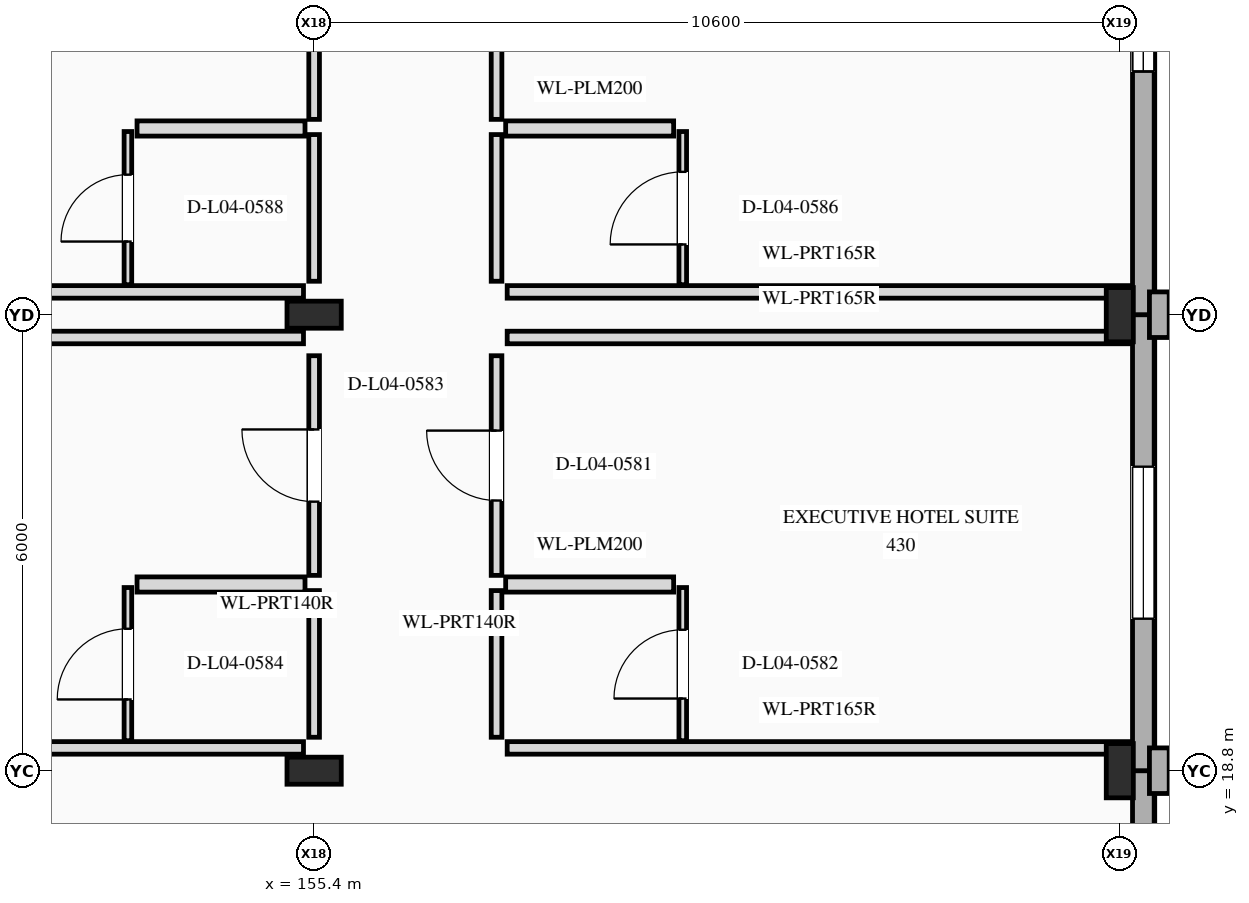
"""IFC4 building model, lengths in metres.
Left out: names, types, materials, properties, quantities, classifications, styles, units other than length and angle.
Written with IfcOpenShell. Run it as: python <this file> out.ifc"""

import sys

from ifc_helpers import new_model, si_unit, direction, frame, frame_2d, origin, origin_2d, place, context, subcontext, project, spatial, rectangle, i_section, extrude, element, fill, save


model = new_model("IFC4")
c1 = context("Model", 3, precision=1e-05, world=origin(), true_north=direction((0.0, 1.0)))
c2 = subcontext(c1, "Body", "Model", "MODEL_VIEW")
j1 = project(units=[si_unit("LENGTHUNIT", "METRE"), si_unit("PLANEANGLEUNIT", "RADIAN")], contexts=[c1])
p1 = place(None, origin())
s1 = spatial("IfcSite", under=j1, at=p1, CompositionType="ELEMENT")
p2 = place(p1, origin())
s2 = spatial("IfcBuilding", under=s1, at=p2, CompositionType="ELEMENT")
p3 = place(p2, frame((0.0, 0.0, 19.5)))
s3 = spatial("IfcBuildingStorey", under=s2, at=p3, CompositionType="ELEMENT", Elevation=19.5)
for number, where, z_axis, x_axis in (
    (1, (155.4, 18.8, 0.0), (0.0, 0.0, 1.0), (0.0, 1.0, 0.0)),
    (2, (155.4, 24.8, 0.0), (0.0, 0.0, 1.0), (0.0, 1.0, 0.0)),
    (3, (166.0, 18.8, 0.0), (0.0, 0.0, 1.0), (1.0, 0.0, 0.0)),
    (4, (166.0, 24.8, 0.0), (0.0, 0.0, 1.0), (1.0, 0.0, 0.0)),
):
    element("IfcColumn", number, at=place(p3, frame(where, z_axis=z_axis, x_axis=x_axis)), inside=s3, PredefinedType="COLUMN", context=c2, shape_type="SweptSolid", body=[
        extrude(i_section(OverallWidth=0.356, OverallDepth=0.714, WebThickness=0.019, FlangeThickness=0.034, at=origin_2d()), origin(), (0.0, 0.0, 1.0), 3.9),
    ])
p4 = place(p3, frame((166.31, 14.46, 0.0), z_axis=(0.0, 0.0, 1.0), x_axis=(0.0, 1.0, 0.0)))
e5 = element("IfcWall", 5, at=p4, inside=s3, PredefinedType="STANDARD", context=c2, shape_type="SweptSolid", body=[
    extrude(rectangle(XDim=4.34, YDim=0.285, at=frame_2d((2.17, 0.0))), origin(), (0.0, 0.0, 1.0), 3.9),
])
p5 = place(p4, frame((1.42, 0.0, 0.88)))
e6 = element("IfcOpeningElement", 6, at=p5, cuts=e5, PredefinedType="OPENING", context=c2, shape_type="SweptSolid", body=[
    extrude(rectangle(XDim=1.5, YDim=1.7, at=frame_2d((0.75, 0.85))), frame((0.0, 0.152, 0.0), z_axis=(0.0, -1.0, 0.0), x_axis=(1.0, 0.0, 0.0)), (0.0, 0.0, 1.0), 0.305),
])
p6 = place(p3, frame((166.31, 18.8, 0.0), z_axis=(0.0, 0.0, 1.0), x_axis=(0.0, 1.0, 0.0)))
e7 = element("IfcWall", 7, at=p6, inside=s3, PredefinedType="STANDARD", context=c2, shape_type="SweptSolid", body=[
    extrude(rectangle(XDim=6.0, YDim=0.285, at=frame_2d((3.0, 0.0))), origin(), (0.0, 0.0, 1.0), 3.9),
])
p7 = place(p6, frame((2.0, 0.0, 0.85)))
e8 = element("IfcOpeningElement", 8, at=p7, cuts=e7, PredefinedType="OPENING", context=c2, shape_type="SweptSolid", body=[
    extrude(rectangle(XDim=2.0, YDim=1.65, at=frame_2d((1.0, 0.825))), frame((0.0, 0.152, 0.0), z_axis=(0.0, -1.0, 0.0), x_axis=(1.0, 0.0, 0.0)), (0.0, 0.0, 1.0), 0.305),
])
p8 = place(p3, frame((166.52, 18.5, 0.0), z_axis=(0.0, 0.0, 1.0), x_axis=(0.0, 1.0, 0.0)))
e9 = element("IfcWall", 9, at=p8, inside=s3, PredefinedType="ELEMENTEDWALL", context=c2, shape_type="SweptSolid", body=[
    extrude(rectangle(XDim=0.6, YDim=0.26, at=frame_2d((0.3, 0.0))), origin(), (0.0, 0.0, 1.0), 3.9),
])
p9 = place(p3, frame((166.31, 24.8, 0.0), z_axis=(0.0, 0.0, 1.0), x_axis=(0.0, 1.0, 0.0)))
e10 = element("IfcWall", 10, at=p9, inside=s3, PredefinedType="STANDARD", context=c2, shape_type="SweptSolid", body=[
    extrude(rectangle(XDim=8.4, YDim=0.285, at=frame_2d((4.2, 0.0))), origin(), (0.0, 0.0, 1.0), 3.9),
])
p10 = place(p9, frame((3.2, 0.0, 0.85)))
e11 = element("IfcOpeningElement", 11, at=p10, cuts=e10, PredefinedType="OPENING", context=c2, shape_type="SweptSolid", body=[
    extrude(rectangle(XDim=2.0, YDim=1.65, at=frame_2d((1.0, 0.825))), frame((0.0, 0.152, 0.0), z_axis=(0.0, -1.0, 0.0), x_axis=(1.0, 0.0, 0.0)), (0.0, 0.0, 1.0), 0.305),
])
p11 = place(p3, frame((166.52, 24.5, 0.0), z_axis=(0.0, 0.0, 1.0), x_axis=(0.0, 1.0, 0.0)))
e12 = element("IfcWall", 12, at=p11, inside=s3, PredefinedType="ELEMENTEDWALL", context=c2, shape_type="SweptSolid", body=[
    extrude(rectangle(XDim=0.6, YDim=0.26, at=frame_2d((0.3, 0.0))), origin(), (0.0, 0.0, 1.0), 3.9),
])
p12 = place(p3, frame((157.8, 19.24, 0.0), z_axis=(0.0, 0.0, 1.0), x_axis=(0.0, 1.0, 0.0)))
e13 = element("IfcWall", 13, at=p12, inside=s3, PredefinedType="PARTITIONING", context=c2, shape_type="SweptSolid", body=[
    extrude(rectangle(XDim=1.93, YDim=0.14, at=frame_2d((0.965, 0.0))), origin(), (0.0, 0.0, 1.0), 3.143),
])
p13 = place(p3, frame((157.8, 21.37, 0.0), z_axis=(0.0, 0.0, 1.0), x_axis=(0.0, 1.0, 0.0)))
e14 = element("IfcWall", 14, at=p13, inside=s3, PredefinedType="PARTITIONING", context=c2, shape_type="SweptSolid", body=[
    extrude(rectangle(XDim=2.89, YDim=0.14, at=frame_2d((1.445, 0.0))), origin(), (0.0, 0.0, 1.0), 3.143),
])
p14 = place(p13, frame((0.985, 0.0, 0.0)))
e15 = element("IfcOpeningElement", 15, at=p14, cuts=e14, PredefinedType="OPENING", context=c2, shape_type="SweptSolid", body=[
    extrude(rectangle(XDim=0.92, YDim=2.15, at=frame_2d((0.46, 1.075))), frame((0.0, 0.08, 0.0), z_axis=(0.0, -1.0, 0.0), x_axis=(1.0, 0.0, 0.0)), (0.0, 0.0, 1.0), 0.16),
])
for number, where, z_axis, x_axis in (
    (16, (157.94, 19.1, 0.0), (0.0, 0.0, 1.0), (1.0, 0.0, 0.0)),
    (17, (157.94, 24.5, 0.0), (0.0, 0.0, 1.0), (1.0, 0.0, 0.0)),
):
    element("IfcWall", number, at=place(p3, frame(where, z_axis=z_axis, x_axis=x_axis)), inside=s3, PredefinedType="PARTITIONING", context=c2, shape_type="SweptSolid", body=[
        extrude(rectangle(XDim=8.213, YDim=0.165, at=frame_2d((4.106, 0.0))), origin(), (0.0, 0.0, 1.0), 2.975),
    ])
p15 = place(p3, frame((157.92, 21.25, 0.0), z_axis=(0.0, 0.0, 1.0), x_axis=(1.0, 0.0, 0.0)))
e18 = element("IfcWall", 18, at=p15, inside=s3, PredefinedType="PLUMBINGWALL", context=c2, shape_type="SweptSolid", body=[
    extrude(rectangle(XDim=2.21, YDim=0.2, at=frame_2d((1.105, 0.0))), origin(), (0.0, 0.0, 1.0), 3.585),
])
p16 = place(p3, frame((160.25, 19.195, 0.0), z_axis=(0.0, 0.0, 1.0), x_axis=(0.0, 1.0, 0.0)))
e19 = element("IfcWall", 19, at=p16, inside=s3, PredefinedType="PARTITIONING", context=c2, shape_type="SweptSolid", body=[
    extrude(rectangle(XDim=2.015, YDim=0.1, at=frame_2d((1.008, 0.0))), origin(), (0.0, 0.0, 1.0), 3.143),
])
p17 = place(p16, frame((0.555, 0.0, 0.0)))
e20 = element("IfcOpeningElement", 20, at=p17, cuts=e19, PredefinedType="OPENING", context=c2, shape_type="SweptSolid", body=[
    extrude(rectangle(XDim=0.905, YDim=2.1, at=frame_2d((0.453, 1.05))), frame((0.0, 0.06, 0.0), z_axis=(0.0, -1.0, 0.0), x_axis=(1.0, 0.0, 0.0)), (0.0, 0.0, 1.0), 0.12),
])
p18 = place(p3, frame((155.4, 19.24, 0.0), z_axis=(0.0, 0.0, 1.0), x_axis=(0.0, 1.0, 0.0)))
e21 = element("IfcWall", 21, at=p18, inside=s3, PredefinedType="PARTITIONING", context=c2, shape_type="SweptSolid", body=[
    extrude(rectangle(XDim=1.93, YDim=0.14, at=frame_2d((0.965, 0.0))), origin(), (0.0, 0.0, 1.0), 3.059),
])
p19 = place(p3, frame((155.4, 21.37, 0.0), z_axis=(0.0, 0.0, 1.0), x_axis=(0.0, 1.0, 0.0)))
e22 = element("IfcWall", 22, at=p19, inside=s3, PredefinedType="PARTITIONING", context=c2, shape_type="SweptSolid", body=[
    extrude(rectangle(XDim=2.89, YDim=0.14, at=frame_2d((1.445, 0.0))), origin(), (0.0, 0.0, 1.0), 3.059),
])
p20 = place(p19, frame((0.97, 0.0, 0.0)))
e23 = element("IfcOpeningElement", 23, at=p20, cuts=e22, PredefinedType="OPENING", context=c2, shape_type="SweptSolid", body=[
    extrude(rectangle(XDim=0.95, YDim=2.15, at=frame_2d((0.475, 1.075))), frame((0.0, 0.08, 0.0), z_axis=(0.0, -1.0, 0.0), x_axis=(1.0, 0.0, 0.0)), (0.0, 0.0, 1.0), 0.16),
])
p21 = place(p3, frame((147.04, 19.1, 0.0), z_axis=(0.0, 0.0, 1.0), x_axis=(1.0, 0.0, 0.0)))
e24 = element("IfcWall", 24, at=p21, inside=s3, PredefinedType="PARTITIONING", context=c2, shape_type="SweptSolid", body=[
    extrude(rectangle(XDim=8.22, YDim=0.165, at=frame_2d((4.11, 0.0))), origin(), (0.0, 0.0, 1.0), 3.585),
])
p22 = place(p3, frame((147.048, 24.5, 0.0), z_axis=(0.0, 0.0, 1.0), x_axis=(1.0, 0.0, 0.0)))
e25 = element("IfcWall", 25, at=p22, inside=s3, PredefinedType="PARTITIONING", context=c2, shape_type="SweptSolid", body=[
    extrude(rectangle(XDim=8.212, YDim=0.165, at=frame_2d((4.106, 0.0))), origin(), (0.0, 0.0, 1.0), 2.998),
])
p23 = place(p3, frame((153.07, 21.25, 0.0), z_axis=(0.0, 0.0, 1.0), x_axis=(1.0, 0.0, 0.0)))
e26 = element("IfcWall", 26, at=p23, inside=s3, PredefinedType="PLUMBINGWALL", context=c2, shape_type="SweptSolid", body=[
    extrude(rectangle(XDim=2.21, YDim=0.2, at=frame_2d((1.105, 0.0))), origin(), (0.0, 0.0, 1.0), 3.585),
])
p24 = place(p3, frame((152.95, 19.195, 0.0), z_axis=(0.0, 0.0, 1.0), x_axis=(0.0, 1.0, 0.0)))
e27 = element("IfcWall", 27, at=p24, inside=s3, PredefinedType="PARTITIONING", context=c2, shape_type="SweptSolid", body=[
    extrude(rectangle(XDim=2.015, YDim=0.1, at=frame_2d((1.008, 0.0))), origin(), (0.0, 0.0, 1.0), 3.585),
])
p25 = place(p24, frame((0.543, 0.0, 0.0)))
e28 = element("IfcOpeningElement", 28, at=p25, cuts=e27, PredefinedType="OPENING", context=c2, shape_type="SweptSolid", body=[
    extrude(rectangle(XDim=0.93, YDim=2.14, at=frame_2d((0.465, 1.07))), frame((0.0, 0.06, 0.0), z_axis=(0.0, -1.0, 0.0), x_axis=(1.0, 0.0, 0.0)), (0.0, 0.0, 1.0), 0.12),
])
p26 = place(p3, frame((157.8, 25.24, 0.0), z_axis=(0.0, 0.0, 1.0), x_axis=(0.0, 1.0, 0.0)))
e29 = element("IfcWall", 29, at=p26, inside=s3, PredefinedType="PARTITIONING", context=c2, shape_type="SweptSolid", body=[
    extrude(rectangle(XDim=1.93, YDim=0.14, at=frame_2d((0.965, 0.0))), origin(), (0.0, 0.0, 1.0), 3.138),
])
p27 = place(p3, frame((157.8, 27.37, 0.0), z_axis=(0.0, 0.0, 1.0), x_axis=(0.0, 1.0, 0.0)))
e30 = element("IfcWall", 30, at=p27, inside=s3, PredefinedType="PARTITIONING", context=c2, shape_type="SweptSolid", body=[
    extrude(rectangle(XDim=5.29, YDim=0.14, at=frame_2d((2.645, 0.0))), origin(), (0.0, 0.0, 1.0), 3.138),
])
p28 = place(p27, frame((2.155, 0.0, 0.0)))
e31 = element("IfcOpeningElement", 31, at=p28, cuts=e30, PredefinedType="OPENING", context=c2, shape_type="SweptSolid", body=[
    extrude(rectangle(XDim=0.98, YDim=2.2, at=frame_2d((0.49, 1.1))), frame((0.0, 0.08, 0.0), z_axis=(0.0, -1.0, 0.0), x_axis=(1.0, 0.0, 0.0)), (0.0, 0.0, 1.0), 0.16),
])
p29 = place(p3, frame((157.94, 25.1, 0.0), z_axis=(0.0, 0.0, 1.0), x_axis=(1.0, 0.0, 0.0)))
e32 = element("IfcWall", 32, at=p29, inside=s3, PredefinedType="PARTITIONING", context=c2, shape_type="SweptSolid", body=[
    extrude(rectangle(XDim=8.213, YDim=0.165, at=frame_2d((4.106, 0.0))), origin(), (0.0, 0.0, 1.0), 2.975),
])
p30 = place(p3, frame((157.92, 27.25, 0.0), z_axis=(0.0, 0.0, 1.0), x_axis=(1.0, 0.0, 0.0)))
e33 = element("IfcWall", 33, at=p30, inside=s3, PredefinedType="PLUMBINGWALL", context=c2, shape_type="SweptSolid", body=[
    extrude(rectangle(XDim=2.21, YDim=0.2, at=frame_2d((1.105, 0.0))), origin(), (0.0, 0.0, 1.0), 3.585),
])
p31 = place(p3, frame((160.25, 25.195, 0.0), z_axis=(0.0, 0.0, 1.0), x_axis=(0.0, 1.0, 0.0)))
e34 = element("IfcWall", 34, at=p31, inside=s3, PredefinedType="PARTITIONING", context=c2, shape_type="SweptSolid", body=[
    extrude(rectangle(XDim=2.015, YDim=0.1, at=frame_2d((1.008, 0.0))), origin(), (0.0, 0.0, 1.0), 3.138),
])
p32 = place(p31, frame((0.53, 0.0, 0.0)))
e35 = element("IfcOpeningElement", 35, at=p32, cuts=e34, PredefinedType="OPENING", context=c2, shape_type="SweptSolid", body=[
    extrude(rectangle(XDim=0.955, YDim=2.14, at=frame_2d((0.478, 1.07))), frame((0.0, 0.06, 0.0), z_axis=(0.0, -1.0, 0.0), x_axis=(1.0, 0.0, 0.0)), (0.0, 0.0, 1.0), 0.12),
])
p33 = place(p3, frame((155.4, 25.24, 0.0), z_axis=(0.0, 0.0, 1.0), x_axis=(0.0, 1.0, 0.0)))
e36 = element("IfcWall", 36, at=p33, inside=s3, PredefinedType="PARTITIONING", context=c2, shape_type="SweptSolid", body=[
    extrude(rectangle(XDim=1.93, YDim=0.14, at=frame_2d((0.965, 0.0))), origin(), (0.0, 0.0, 1.0), 3.059),
])
p34 = place(p3, frame((155.4, 27.37, 0.0), z_axis=(0.0, 0.0, 1.0), x_axis=(0.0, 1.0, 0.0)))
e37 = element("IfcWall", 37, at=p34, inside=s3, PredefinedType="PARTITIONING", context=c2, shape_type="SweptSolid", body=[
    extrude(rectangle(XDim=5.29, YDim=0.14, at=frame_2d((2.645, 0.0))), origin(), (0.0, 0.0, 1.0), 3.059),
])
p35 = place(p34, frame((2.14, 0.0, 0.0)))
e38 = element("IfcOpeningElement", 38, at=p35, cuts=e37, PredefinedType="OPENING", context=c2, shape_type="SweptSolid", body=[
    extrude(rectangle(XDim=1.01, YDim=2.2, at=frame_2d((0.505, 1.1))), frame((0.0, 0.08, 0.0), z_axis=(0.0, -1.0, 0.0), x_axis=(1.0, 0.0, 0.0)), (0.0, 0.0, 1.0), 0.16),
])
p36 = place(p3, frame((147.048, 25.1, 0.0), z_axis=(0.0, 0.0, 1.0), x_axis=(1.0, 0.0, 0.0)))
e39 = element("IfcWall", 39, at=p36, inside=s3, PredefinedType="PARTITIONING", context=c2, shape_type="SweptSolid", body=[
    extrude(rectangle(XDim=8.212, YDim=0.165, at=frame_2d((4.106, 0.0))), origin(), (0.0, 0.0, 1.0), 2.998),
])
p37 = place(p3, frame((153.07, 27.25, 0.0), z_axis=(0.0, 0.0, 1.0), x_axis=(1.0, 0.0, 0.0)))
e40 = element("IfcWall", 40, at=p37, inside=s3, PredefinedType="PLUMBINGWALL", context=c2, shape_type="SweptSolid", body=[
    extrude(rectangle(XDim=2.21, YDim=0.2, at=frame_2d((1.105, 0.0))), origin(), (0.0, 0.0, 1.0), 3.585),
])
p38 = place(p3, frame((152.95, 25.195, 0.0), z_axis=(0.0, 0.0, 1.0), x_axis=(0.0, 1.0, 0.0)))
e41 = element("IfcWall", 41, at=p38, inside=s3, PredefinedType="PARTITIONING", context=c2, shape_type="SweptSolid", body=[
    extrude(rectangle(XDim=2.015, YDim=0.1, at=frame_2d((1.008, 0.0))), origin(), (0.0, 0.0, 1.0), 3.193),
])
p39 = place(p38, frame((0.568, 0.0, 0.0)))
e42 = element("IfcOpeningElement", 42, at=p39, cuts=e41, PredefinedType="OPENING", context=c2, shape_type="SweptSolid", body=[
    extrude(rectangle(XDim=0.88, YDim=2.18, at=frame_2d((0.44, 1.09))), frame((0.0, 0.06, 0.0), z_axis=(0.0, -1.0, 0.0), x_axis=(1.0, 0.0, 0.0)), (0.0, 0.0, 1.0), 0.12),
])
p40 = place(p7, origin())
e43 = element("IfcWindow", 43, at=p40, inside=s3, PartitioningType="SINGLE_PANEL", PredefinedType="WINDOW", context=c2, shape_type="SweptSolid", body=[
    extrude(rectangle(XDim=2.0, YDim=1.65, at=frame_2d((1.0, 0.825))), frame((0.0, 0.03, 0.0), z_axis=(0.0, -1.0, 0.0), x_axis=(1.0, 0.0, 0.0)), (0.0, 0.0, 1.0), 0.06),
])
fill(e8, e43)
p41 = place(p10, origin())
e44 = element("IfcWindow", 44, at=p41, inside=s3, PartitioningType="SINGLE_PANEL", PredefinedType="WINDOW", context=c2, shape_type="SweptSolid", body=[
    extrude(rectangle(XDim=2.0, YDim=1.65, at=frame_2d((1.0, 0.825))), frame((0.0, 0.03, 0.0), z_axis=(0.0, -1.0, 0.0), x_axis=(1.0, 0.0, 0.0)), (0.0, 0.0, 1.0), 0.06),
])
fill(e11, e44)
p42 = place(p14, origin())
e45 = element("IfcDoor", 45, at=p42, inside=s3, OperationType="SINGLE_SWING_RIGHT", PredefinedType="DOOR", context=c2, shape_type="SweptSolid", body=[
    extrude(rectangle(XDim=0.92, YDim=2.15, at=frame_2d((0.46, 1.075))), frame((0.0, 0.025, 0.0), z_axis=(0.0, -1.0, 0.0), x_axis=(1.0, 0.0, 0.0)), (0.0, 0.0, 1.0), 0.05),
])
fill(e15, e45)
p43 = place(p17, origin())
e46 = element("IfcDoor", 46, at=p43, inside=s3, OperationType="SINGLE_SWING_LEFT", PredefinedType="DOOR", context=c2, shape_type="SweptSolid", body=[
    extrude(rectangle(XDim=0.905, YDim=2.1, at=frame_2d((0.453, 1.05))), frame((0.0, 0.025, 0.0), z_axis=(0.0, -1.0, 0.0), x_axis=(1.0, 0.0, 0.0)), (0.0, 0.0, 1.0), 0.05),
])
fill(e20, e46)
p44 = place(p20, origin())
e47 = element("IfcDoor", 47, at=p44, inside=s3, OperationType="SINGLE_SWING_RIGHT", PredefinedType="DOOR", context=c2, shape_type="SweptSolid", body=[
    extrude(rectangle(XDim=0.95, YDim=2.15, at=frame_2d((0.475, 1.075))), frame((0.0, 0.025, 0.0), z_axis=(0.0, -1.0, 0.0), x_axis=(1.0, 0.0, 0.0)), (0.0, 0.0, 1.0), 0.05),
])
fill(e23, e47)
p45 = place(p25, origin())
e48 = element("IfcDoor", 48, at=p45, inside=s3, OperationType="SINGLE_SWING_LEFT", PredefinedType="DOOR", context=c2, shape_type="SweptSolid", body=[
    extrude(rectangle(XDim=0.93, YDim=2.14, at=frame_2d((0.465, 1.07))), frame((0.0, 0.025, 0.0), z_axis=(0.0, -1.0, 0.0), x_axis=(1.0, 0.0, 0.0)), (0.0, 0.0, 1.0), 0.05),
])
fill(e28, e48)
p46 = place(p32, origin())
e49 = element("IfcDoor", 49, at=p46, inside=s3, OperationType="SINGLE_SWING_LEFT", PredefinedType="DOOR", context=c2, shape_type="SweptSolid", body=[
    extrude(rectangle(XDim=0.955, YDim=2.14, at=frame_2d((0.478, 1.07))), frame((0.0, 0.025, 0.0), z_axis=(0.0, -1.0, 0.0), x_axis=(1.0, 0.0, 0.0)), (0.0, 0.0, 1.0), 0.05),
])
fill(e35, e49)
p47 = place(p39, origin())
e50 = element("IfcDoor", 50, at=p47, inside=s3, OperationType="SINGLE_SWING_LEFT", PredefinedType="DOOR", context=c2, shape_type="SweptSolid", body=[
    extrude(rectangle(XDim=0.88, YDim=2.18, at=frame_2d((0.44, 1.09))), frame((0.0, 0.025, 0.0), z_axis=(0.0, -1.0, 0.0), x_axis=(1.0, 0.0, 0.0)), (0.0, 0.0, 1.0), 0.05),
])
fill(e42, e50)
save(model, sys.argv[1])
